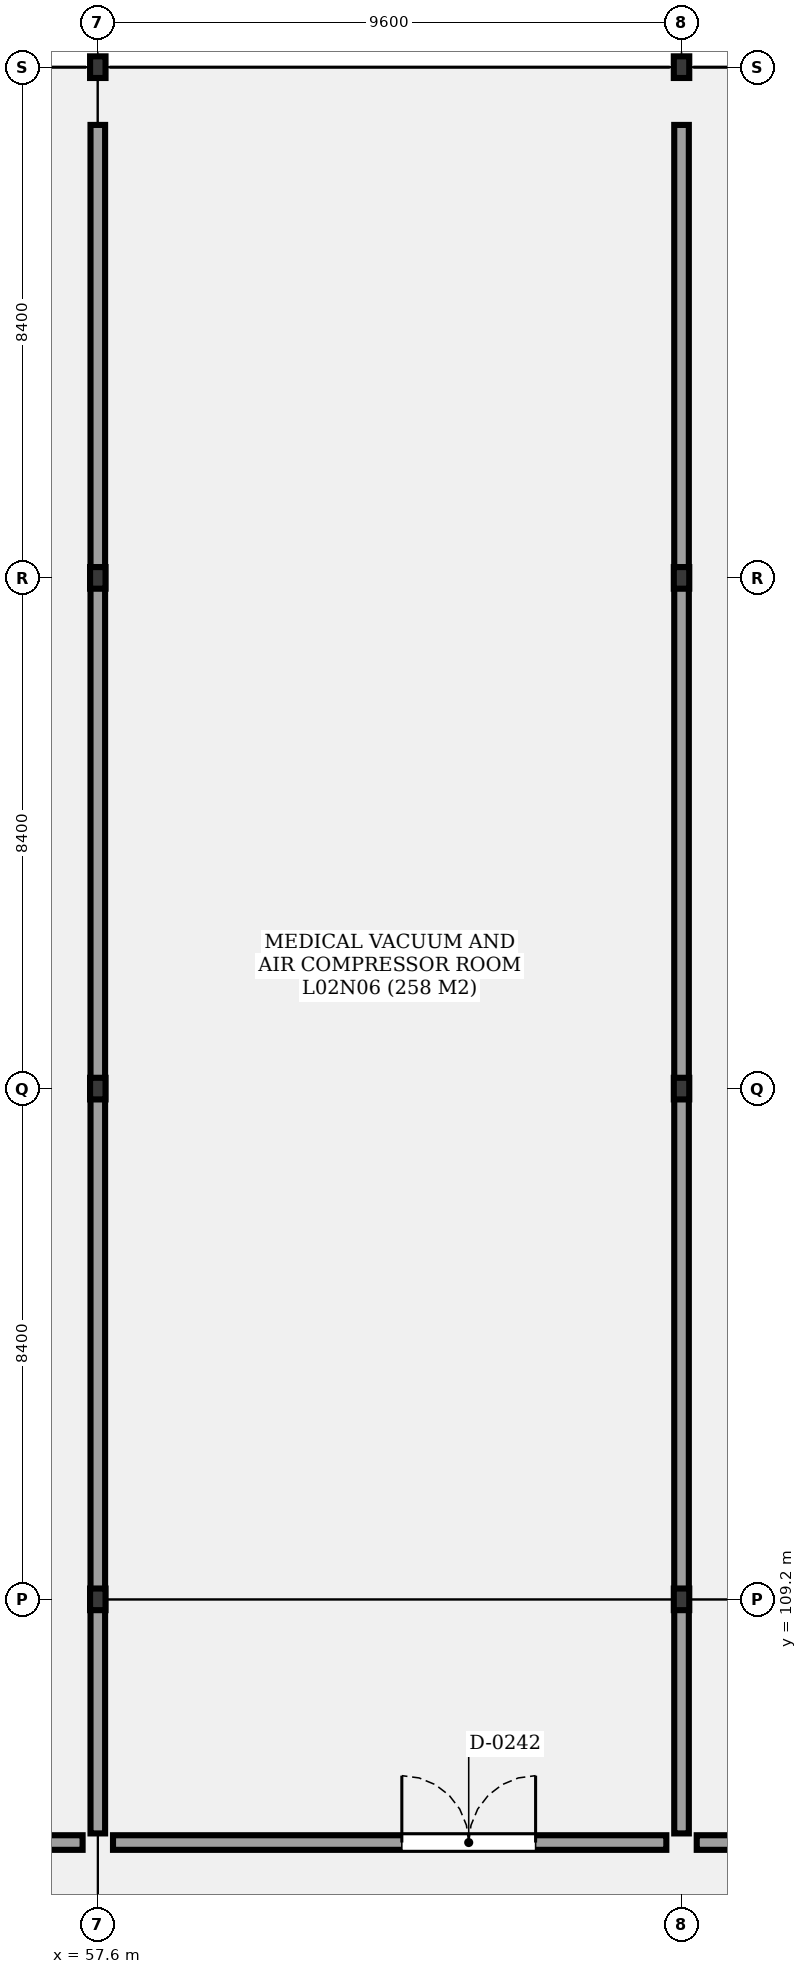
"""IFC4 building model, lengths in metres.
Left out: names, types, materials, properties, quantities, classifications, styles, units other than length and angle.
Written with IfcOpenShell. Run it as: python <this file> out.ifc"""

import sys

from ifc_helpers import new_model, si_unit, direction, frame, frame_2d, origin, origin_2d, place, context, subcontext, project, spatial, rectangle, i_section, extrude, element, fill, save


model = new_model("IFC4")
c1 = context("Model", 3, precision=1e-05, world=origin(), true_north=direction((0.0, 1.0)))
c2 = subcontext(c1, "Body", "Model", "MODEL_VIEW")
j1 = project(units=[si_unit("LENGTHUNIT", "METRE"), si_unit("PLANEANGLEUNIT", "RADIAN")], contexts=[c1])
p1 = place(None, origin())
s1 = spatial("IfcSite", under=j1, at=p1, CompositionType="ELEMENT")
p2 = place(p1, origin())
s2 = spatial("IfcBuilding", under=s1, at=p2, CompositionType="ELEMENT")
p3 = place(p2, frame((0.0, 0.0, 9.9)))
s3 = spatial("IfcBuildingStorey", under=s2, at=p3, CompositionType="ELEMENT", Elevation=9.9)
for number, where, z_axis, x_axis in (
    (1, (57.6, 109.2, 0.0), (0.0, 0.0, 1.0), (0.0, -1.0, 0.0)),
    (2, (57.6, 117.6, 0.0), (0.0, 0.0, 1.0), (0.0, -1.0, 0.0)),
    (3, (57.6, 126.0, 0.0), (0.0, 0.0, 1.0), (0.0, -1.0, 0.0)),
    (4, (57.6, 134.4, 0.0), (0.0, 0.0, 1.0), (0.0, -1.0, 0.0)),
    (5, (67.2, 109.2, 0.0), (0.0, 0.0, 1.0), (0.0, -1.0, 0.0)),
    (6, (67.2, 117.6, 0.0), (0.0, 0.0, 1.0), (0.0, -1.0, 0.0)),
    (7, (67.2, 126.0, 0.0), (0.0, 0.0, 1.0), (0.0, -1.0, 0.0)),
    (8, (67.2, 134.4, 0.0), (0.0, 0.0, 1.0), (0.0, -1.0, 0.0)),
):
    element("IfcColumn", number, at=place(p3, frame(where, z_axis=z_axis, x_axis=x_axis)), inside=s3, PredefinedType="COLUMN", context=c2, shape_type="SweptSolid", body=[
        extrude(i_section(OverallWidth=0.254, OverallDepth=0.356, WebThickness=0.011, FlangeThickness=0.018, at=origin_2d()), origin(), (0.0, 0.0, 1.0), 3.6),
    ])
p4 = place(p3, frame((48.25, 105.2, 0.0), z_axis=(0.0, 0.0, 1.0), x_axis=(1.0, 0.0, 0.0)))
e9 = element("IfcWall", 9, at=p4, inside=s3, PredefinedType="PARTITIONING", context=c2, shape_type="SweptSolid", body=[
    extrude(rectangle(XDim=9.1, YDim=0.24, at=frame_2d((4.55, 0.0))), origin(), (0.0, 0.0, 1.0), 2.48),
])
p5 = place(p4, frame((4.75, 0.0, 0.0)))
e10 = element("IfcOpeningElement", 10, at=p5, cuts=e9, PredefinedType="OPENING", context=c2, shape_type="SweptSolid", body=[
    extrude(rectangle(XDim=2.2, YDim=2.4, at=frame_2d((1.1, 1.2))), frame((0.0, 0.13, 0.0), z_axis=(0.0, -1.0, 0.0), x_axis=(1.0, 0.0, 0.0)), (0.0, 0.0, 1.0), 0.26),
])
p6 = place(p3, frame((57.85, 105.2, 0.0), z_axis=(0.0, 0.0, 1.0), x_axis=(1.0, 0.0, 0.0)))
e11 = element("IfcWall", 11, at=p6, inside=s3, PredefinedType="PARTITIONING", context=c2, shape_type="SweptSolid", body=[
    extrude(rectangle(XDim=9.1, YDim=0.24, at=frame_2d((4.55, 0.0))), origin(), (0.0, 0.0, 1.0), 2.48),
])
p7 = place(p6, frame((4.75, 0.0, 0.0)))
e12 = element("IfcOpeningElement", 12, at=p7, cuts=e11, PredefinedType="OPENING", context=c2, shape_type="SweptSolid", body=[
    extrude(rectangle(XDim=2.2, YDim=2.4, at=frame_2d((1.1, 1.2))), frame((0.0, 0.13, 0.0), z_axis=(0.0, -1.0, 0.0), x_axis=(1.0, 0.0, 0.0)), (0.0, 0.0, 1.0), 0.26),
])
p8 = place(p3, frame((57.6, 105.35, 0.0), z_axis=(0.0, 0.0, 1.0), x_axis=(0.0, 1.0, 0.0)))
e13 = element("IfcWall", 13, at=p8, inside=s3, PredefinedType="PARTITIONING", context=c2, shape_type="SweptSolid", body=[
    extrude(rectangle(XDim=28.1, YDim=0.24, at=frame_2d((14.05, 0.0))), origin(), (0.0, 0.0, 1.0), 2.48),
])
p9 = place(p3, frame((67.45, 105.2, 0.0), z_axis=(0.0, 0.0, 1.0), x_axis=(1.0, 0.0, 0.0)))
e14 = element("IfcWall", 14, at=p9, inside=s3, PredefinedType="PARTITIONING", context=c2, shape_type="SweptSolid", body=[
    extrude(rectangle(XDim=9.1, YDim=0.24, at=frame_2d((4.55, 0.0))), origin(), (0.0, 0.0, 1.0), 2.48),
])
p10 = place(p9, frame((4.75, 0.0, 0.0)))
e15 = element("IfcOpeningElement", 15, at=p10, cuts=e14, PredefinedType="OPENING", context=c2, shape_type="SweptSolid", body=[
    extrude(rectangle(XDim=1.2, YDim=2.4, at=frame_2d((0.6, 1.2))), frame((0.0, 0.13, 0.0), z_axis=(0.0, -1.0, 0.0), x_axis=(1.0, 0.0, 0.0)), (0.0, 0.0, 1.0), 0.26),
])
p11 = place(p3, frame((67.2, 105.35, 0.0), z_axis=(0.0, 0.0, 1.0), x_axis=(0.0, 1.0, 0.0)))
e16 = element("IfcWall", 16, at=p11, inside=s3, PredefinedType="PARTITIONING", context=c2, shape_type="SweptSolid", body=[
    extrude(rectangle(XDim=28.1, YDim=0.24, at=frame_2d((14.05, 0.0))), origin(), (0.0, 0.0, 1.0), 2.48),
])
p12 = place(p7, origin())
e17 = element("IfcDoor", 17, at=p12, inside=s3, OperationType="DOUBLE_DOOR_SINGLE_SWING", PredefinedType="DOOR", context=c2, shape_type="SweptSolid", body=[
    extrude(rectangle(XDim=2.2, YDim=2.4, at=frame_2d((1.1, 1.2))), frame((0.0, 0.025, 0.0), z_axis=(0.0, -1.0, 0.0), x_axis=(1.0, 0.0, 0.0)), (0.0, 0.0, 1.0), 0.05),
])
fill(e12, e17)
save(model, sys.argv[1])
